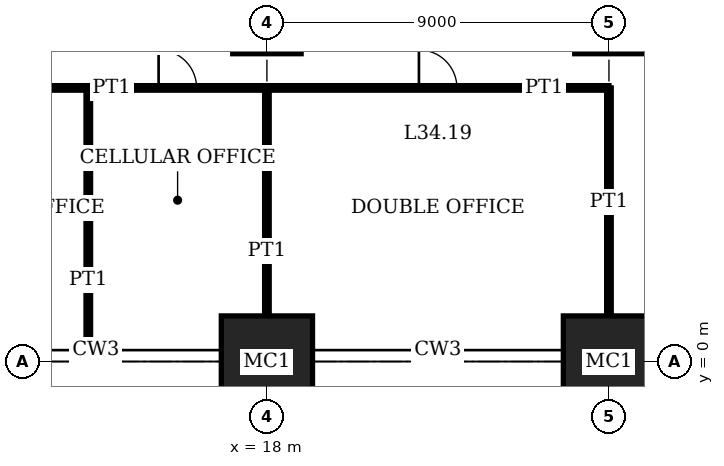
"""IFC4 building model, lengths in metres.
Left out: names, types, materials, properties, quantities, classifications, styles, units other than length and angle.
Written with IfcOpenShell. Run it as: python <this file> out.ifc"""

import sys

from ifc_helpers import new_model, si_unit, direction, frame, frame_2d, origin, origin_2d, place, context, subcontext, project, spatial, rectangle, extrude, element, fill, save


model = new_model("IFC4")
c1 = context("Model", 3, precision=1e-05, world=origin(), true_north=direction((0.0, 1.0)))
c2 = subcontext(c1, "Body", "Model", "MODEL_VIEW")
j1 = project(units=[si_unit("LENGTHUNIT", "METRE"), si_unit("PLANEANGLEUNIT", "RADIAN")], contexts=[c1])
p1 = place(None, origin())
s1 = spatial("IfcSite", under=j1, at=p1, CompositionType="ELEMENT")
p2 = place(p1, origin())
s2 = spatial("IfcBuilding", under=s1, at=p2, CompositionType="ELEMENT")
p3 = place(p2, frame((0.0, 0.0, 141.0)))
s3 = spatial("IfcBuildingStorey", under=s2, at=p3, CompositionType="ELEMENT", Elevation=141.0)
p4 = place(p3, frame((18.0, 0.0, 0.0), z_axis=(0.0, 0.0, 1.0), x_axis=(1.0, 0.0, 0.0)))
e1 = element("IfcColumn", 1, at=p4, inside=s3, PredefinedType="COLUMN", context=c2, shape_type="SweptSolid", body=[
    extrude(rectangle(XDim=2.4, YDim=2.4, at=origin_2d()), origin(), (0.0, 0.0, 1.0), 4.0),
])
p5 = place(p3, frame((18.0, 9.0, 0.0), z_axis=(0.0, 0.0, 1.0), x_axis=(1.0, 0.0, 0.0)))
e2 = element("IfcColumn", 2, at=p5, inside=s3, PredefinedType="COLUMN", context=c2, shape_type="SweptSolid", body=[
    extrude(rectangle(XDim=1.8, YDim=1.8, at=origin_2d()), origin(), (0.0, 0.0, 1.0), 4.0),
])
p6 = place(p3, frame((27.0, 0.0, 0.0), z_axis=(0.0, 0.0, 1.0), x_axis=(1.0, 0.0, 0.0)))
e3 = element("IfcColumn", 3, at=p6, inside=s3, PredefinedType="COLUMN", context=c2, shape_type="SweptSolid", body=[
    extrude(rectangle(XDim=2.4, YDim=2.4, at=origin_2d()), origin(), (0.0, 0.0, 1.0), 4.0),
])
p7 = place(p3, frame((27.0, 9.0, 0.0), z_axis=(0.0, 0.0, 1.0), x_axis=(1.0, 0.0, 0.0)))
e4 = element("IfcColumn", 4, at=p7, inside=s3, PredefinedType="COLUMN", context=c2, shape_type="SweptSolid", body=[
    extrude(rectangle(XDim=1.8, YDim=1.8, at=origin_2d()), origin(), (0.0, 0.0, 1.0), 4.0),
])
p8 = place(p3, frame((9.0, 7.2, 0.0), z_axis=(0.0, 0.0, 1.0), x_axis=(1.0, 0.0, 0.0)))
e5 = element("IfcWall", 5, at=p8, inside=s3, PredefinedType="PARTITIONING", context=c2, shape_type="SweptSolid", body=[
    extrude(rectangle(XDim=4.3, YDim=0.12, at=frame_2d((2.15, 0.0))), origin(), (0.0, 0.0, 1.0), 3.75),
])
p9 = place(p8, frame((1.65, 0.0, 0.0)))
e6 = element("IfcOpeningElement", 6, at=p9, cuts=e5, PredefinedType="OPENING", context=c2, shape_type="SweptSolid", body=[
    extrude(rectangle(XDim=1.0, YDim=2.4, at=frame_2d((0.5, 1.2))), frame((0.0, 0.07, 0.0), z_axis=(0.0, -1.0, 0.0), x_axis=(1.0, 0.0, 0.0)), (0.0, 0.0, 1.0), 0.14),
])
p10 = place(p3, frame((13.3, 7.2, 0.0), z_axis=(0.0, 0.0, 1.0), x_axis=(1.0, 0.0, 0.0)))
e7 = element("IfcWall", 7, at=p10, inside=s3, PredefinedType="PARTITIONING", context=c2, shape_type="SweptSolid", body=[
    extrude(rectangle(XDim=4.7, YDim=0.12, at=frame_2d((2.35, 0.0))), origin(), (0.0, 0.0, 1.0), 3.75),
])
p11 = place(p10, frame((1.85, 0.0, 0.0)))
e8 = element("IfcOpeningElement", 8, at=p11, cuts=e7, PredefinedType="OPENING", context=c2, shape_type="SweptSolid", body=[
    extrude(rectangle(XDim=1.0, YDim=2.4, at=frame_2d((0.5, 1.2))), frame((0.0, 0.07, 0.0), z_axis=(0.0, -1.0, 0.0), x_axis=(1.0, 0.0, 0.0)), (0.0, 0.0, 1.0), 0.14),
])
p12 = place(p3, frame((18.0, 7.2, 0.0), z_axis=(0.0, 0.0, 1.0), x_axis=(1.0, 0.0, 0.0)))
e9 = element("IfcWall", 9, at=p12, inside=s3, PredefinedType="PARTITIONING", context=c2, shape_type="SweptSolid", body=[
    extrude(rectangle(XDim=9.0, YDim=0.12, at=frame_2d((4.5, 0.0))), origin(), (0.0, 0.0, 1.0), 3.75),
])
p13 = place(p12, frame((4.0, 0.0, 0.0)))
e10 = element("IfcOpeningElement", 10, at=p13, cuts=e9, PredefinedType="OPENING", context=c2, shape_type="SweptSolid", body=[
    extrude(rectangle(XDim=1.0, YDim=2.4, at=frame_2d((0.5, 1.2))), frame((0.0, 0.07, 0.0), z_axis=(0.0, -1.0, 0.0), x_axis=(1.0, 0.0, 0.0)), (0.0, 0.0, 1.0), 0.14),
])
p14 = place(p3, frame((13.3, 0.31, 0.0), z_axis=(0.0, 0.0, 1.0), x_axis=(0.0, 1.0, 0.0)))
e11 = element("IfcWall", 11, at=p14, inside=s3, PredefinedType="PARTITIONING", context=c2, shape_type="SweptSolid", body=[
    extrude(rectangle(XDim=6.89, YDim=0.12, at=frame_2d((3.445, 0.0))), origin(), (0.0, 0.0, 1.0), 3.75),
])
for number, where, z_axis, x_axis in (
    (12, (18.0, 1.2, 0.0), (0.0, 0.0, 1.0), (0.0, 1.0, 0.0)),
    (13, (27.0, 1.2, 0.0), (0.0, 0.0, 1.0), (0.0, 1.0, 0.0)),
):
    element("IfcWall", number, at=place(p3, frame(where, z_axis=z_axis, x_axis=x_axis)), inside=s3, PredefinedType="PARTITIONING", context=c2, shape_type="SweptSolid", body=[
        extrude(rectangle(XDim=6.0, YDim=0.12, at=frame_2d((3.0, 0.0))), origin(), (0.0, 0.0, 1.0), 3.05),
    ])
p15 = place(p11, origin())
e14 = element("IfcDoor", 14, at=p15, inside=s3, OperationType="SINGLE_SWING_RIGHT", PredefinedType="DOOR", context=c2, shape_type="SweptSolid", body=[
    extrude(rectangle(XDim=1.0, YDim=2.4, at=frame_2d((0.5, 1.2))), frame((0.0, 0.025, 0.0), z_axis=(0.0, -1.0, 0.0), x_axis=(1.0, 0.0, 0.0)), (0.0, 0.0, 1.0), 0.05),
])
fill(e8, e14)
p16 = place(p13, origin())
e15 = element("IfcDoor", 15, at=p16, inside=s3, OperationType="SINGLE_SWING_RIGHT", PredefinedType="DOOR", context=c2, shape_type="SweptSolid", body=[
    extrude(rectangle(XDim=1.0, YDim=2.4, at=frame_2d((0.5, 1.2))), frame((0.0, 0.025, 0.0), z_axis=(0.0, -1.0, 0.0), x_axis=(1.0, 0.0, 0.0)), (0.0, 0.0, 1.0), 0.05),
])
fill(e10, e15)
save(model, sys.argv[1])
